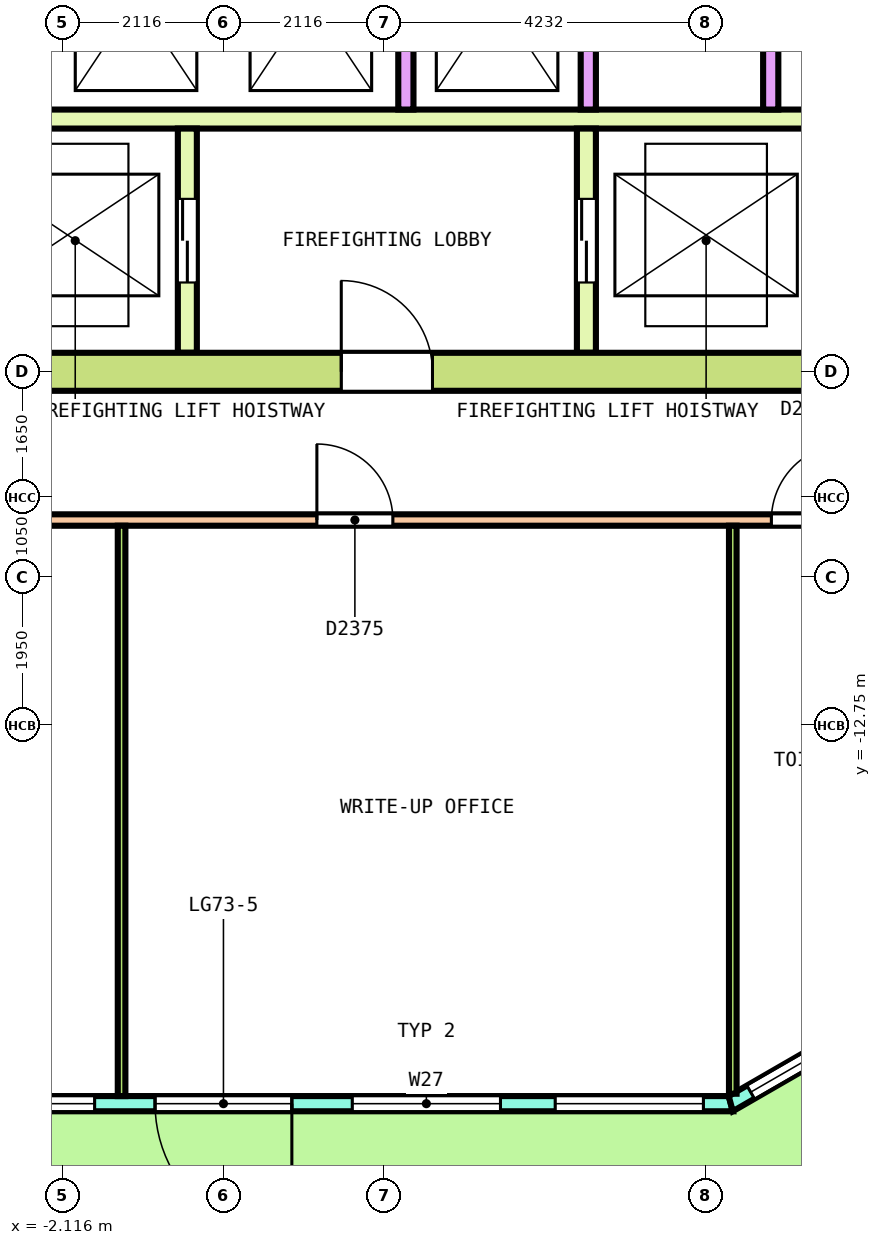
"""IFC4 building model, lengths in metres.
Left out: names, types, materials, properties, quantities, classifications, styles, units other than length and angle.
Written with IfcOpenShell. Run it as: python <this file> out.ifc"""

import sys

from ifc_helpers import new_model, si_unit, direction, frame, frame_2d, origin, place, context, subcontext, project, spatial, polyline, rectangle, outline, extrude, element, fill, save


model = new_model("IFC4")
c1 = context("Model", 3, precision=1e-05, world=origin(), true_north=direction((0.0, 1.0)))
c2 = subcontext(c1, "Body", "Model", "MODEL_VIEW")
j1 = project(units=[si_unit("LENGTHUNIT", "METRE"), si_unit("PLANEANGLEUNIT", "RADIAN")], contexts=[c1])
p1 = place(None, origin())
s1 = spatial("IfcSite", under=j1, at=p1, CompositionType="ELEMENT")
p2 = place(p1, origin())
s2 = spatial("IfcBuilding", under=s1, at=p2, CompositionType="ELEMENT")
p3 = place(p2, frame((0.0, 0.0, 328.6)))
s3 = spatial("IfcBuildingStorey", under=s2, at=p3, CompositionType="ELEMENT", Elevation=328.6)
p4 = place(p3, frame((-6.674, -17.729, 0.0), z_axis=(0.0, 0.0, 1.0), x_axis=(1.0, 0.0, 0.0)))
e1 = element("IfcWall", 1, at=p4, inside=s3, PredefinedType="SOLIDWALL", context=c2, shape_type="SweptSolid", body=[
    extrude(outline(polyline([(-0.027, -0.1), (1.004, -0.1), (2.035, -0.1), (3.066, -0.1), (4.097, -0.1), (5.128, -0.1), (6.159, -0.1), (7.189, -0.1), (8.22, -0.1), (9.251, -0.1), (10.282, -0.1), (11.313, -0.1), (12.344, -0.1), (13.375, -0.1), (13.321, 0.1), (12.299, 0.1), (11.276, 0.1), (10.253, 0.1), (9.231, 0.1), (8.208, 0.1), (7.185, 0.1), (6.163, 0.1), (5.14, 0.1), (4.117, 0.1), (3.095, 0.1), (2.072, 0.1), (1.05, 0.1), (0.027, 0.1), (-0.027, -0.1)])), origin(), (0.0, 0.0, 1.0), 3.7),
])
p5 = place(p4, frame((0.36, 0.0, 0.1)))
e2 = element("IfcOpeningElement", 2, at=p5, cuts=e1, PredefinedType="OPENING", context=c2, shape_type="SweptSolid", body=[
    extrude(rectangle(XDim=1.95, YDim=2.9, at=frame_2d((0.975, 1.45))), frame((0.0, 0.11, 0.0), z_axis=(0.0, -1.0, 0.0), x_axis=(1.0, 0.0, 0.0)), (0.0, 0.0, 1.0), 0.22),
])
p6 = place(p4, frame((3.03, 0.0, 0.1)))
e3 = element("IfcOpeningElement", 3, at=p6, cuts=e1, PredefinedType="OPENING", context=c2, shape_type="SweptSolid", body=[
    extrude(rectangle(XDim=1.95, YDim=2.9, at=frame_2d((0.975, 1.45))), frame((0.0, 0.11, 0.0), z_axis=(0.0, -1.0, 0.0), x_axis=(1.0, 0.0, 0.0)), (0.0, 0.0, 1.0), 0.22),
])
p7 = place(p4, frame((5.774, 0.0, 0.0)))
e4 = element("IfcOpeningElement", 4, at=p7, cuts=e1, PredefinedType="OPENING", context=c2, shape_type="SweptSolid", body=[
    extrude(rectangle(XDim=1.8, YDim=2.4, at=frame_2d((0.9, 1.2))), frame((0.0, 0.11, 0.0), z_axis=(0.0, -1.0, 0.0), x_axis=(1.0, 0.0, 0.0)), (0.0, 0.0, 1.0), 0.22),
])
p8 = place(p4, frame((5.774, 0.0, 2.55)))
e5 = element("IfcOpeningElement", 5, at=p8, cuts=e1, PredefinedType="OPENING", context=c2, shape_type="SweptSolid", body=[
    extrude(rectangle(XDim=1.8, YDim=0.45, at=frame_2d((0.9, 0.225))), frame((0.0, 0.11, 0.0), z_axis=(0.0, -1.0, 0.0), x_axis=(1.0, 0.0, 0.0)), (0.0, 0.0, 1.0), 0.22),
])
p9 = place(p4, frame((8.369, 0.0, 0.1)))
e6 = element("IfcOpeningElement", 6, at=p9, cuts=e1, PredefinedType="OPENING", context=c2, shape_type="SweptSolid", body=[
    extrude(rectangle(XDim=1.95, YDim=2.9, at=frame_2d((0.975, 1.45))), frame((0.0, 0.11, 0.0), z_axis=(0.0, -1.0, 0.0), x_axis=(1.0, 0.0, 0.0)), (0.0, 0.0, 1.0), 0.22),
])
p10 = place(p4, frame((11.038, 0.0, 0.1)))
e7 = element("IfcOpeningElement", 7, at=p10, cuts=e1, PredefinedType="OPENING", context=c2, shape_type="SweptSolid", body=[
    extrude(rectangle(XDim=1.95, YDim=2.9, at=frame_2d((0.975, 1.45))), frame((0.0, 0.11, 0.0), z_axis=(0.0, -1.0, 0.0), x_axis=(1.0, 0.0, 0.0)), (0.0, 0.0, 1.0), 0.22),
])
p11 = place(p3, frame((6.674, -17.729, 0.0), z_axis=(0.0, 0.0, 1.0), x_axis=(0.866029143232, 0.499993523031, 0.0)))
e8 = element("IfcWall", 8, at=p11, inside=s3, PredefinedType="SOLIDWALL", context=c2, shape_type="SweptSolid", body=[
    extrude(outline(polyline([(-0.027, -0.1), (1.214, -0.1), (2.456, -0.1), (3.697, -0.1), (4.938, -0.1), (4.885, 0.1), (3.67, 0.1), (2.456, 0.1), (1.241, 0.1), (0.027, 0.1), (-0.027, -0.1)])), origin(), (0.0, 0.0, 1.0), 3.7),
])
p12 = place(p11, frame((0.303, 0.0, 0.1)))
e9 = element("IfcOpeningElement", 9, at=p12, cuts=e8, PredefinedType="OPENING", context=c2, shape_type="SweptSolid", body=[
    extrude(rectangle(XDim=1.85, YDim=2.9, at=frame_2d((0.925, 1.45))), frame((0.0, 0.11, 0.0), z_axis=(0.0, -1.0, 0.0), x_axis=(1.0, 0.0, 0.0)), (0.0, 0.0, 1.0), 0.22),
])
p13 = place(p11, frame((2.759, 0.0, 0.1)))
e10 = element("IfcOpeningElement", 10, at=p13, cuts=e8, PredefinedType="OPENING", context=c2, shape_type="SweptSolid", body=[
    extrude(rectangle(XDim=1.85, YDim=2.9, at=frame_2d((0.925, 1.45))), frame((0.0, 0.11, 0.0), z_axis=(0.0, -1.0, 0.0), x_axis=(1.0, 0.0, 0.0)), (0.0, 0.0, 1.0), 0.22),
])
p14 = place(p3, frame((-9.85, -8.1, 0.0), z_axis=(0.0, 0.0, 1.0), x_axis=(1.0, 0.0, 0.0)))
e11 = element("IfcWall", 11, at=p14, inside=s3, PredefinedType="SHEAR", context=c2, shape_type="SweptSolid", body=[
    extrude(rectangle(XDim=19.7, YDim=0.5, at=frame_2d((9.85, 0.0))), origin(), (0.0, 0.0, 1.0), 3.7),
])
p15 = place(p14, frame((11.4, 0.0, 0.0)))
e12 = element("IfcOpeningElement", 12, at=p15, cuts=e11, PredefinedType="OPENING", context=c2, shape_type="SweptSolid", body=[
    extrude(rectangle(XDim=1.2, YDim=2.1, at=frame_2d((0.6, 1.05))), frame((0.0, 0.26, 0.0), z_axis=(0.0, -1.0, 0.0), x_axis=(1.0, 0.0, 0.0)), (0.0, 0.0, 1.0), 0.52),
])
p16 = place(p3, frame((-9.35, -4.775, 0.0), z_axis=(0.0, 0.0, 1.0), x_axis=(1.0, 0.0, 0.0)))
e13 = element("IfcWall", 13, at=p16, inside=s3, PredefinedType="SOLIDWALL", context=c2, shape_type="SweptSolid", body=[
    extrude(rectangle(XDim=18.7, YDim=0.25, at=frame_2d((9.35, 0.0))), origin(), (0.0, 0.0, 1.0), 3.7),
])
for number, where, z_axis, x_axis in (
    (14, (2.4, -4.65, 0.0), (0.0, 0.0, 1.0), (0.0, 1.0, 0.0)),
    (15, (4.8, -4.65, 0.0), (0.0, 0.0, 1.0), (0.0, 1.0, 0.0)),
    (16, (7.2, -4.65, 0.0), (0.0, 0.0, 1.0), (0.0, 1.0, 0.0)),
):
    element("IfcWall", number, at=place(p3, frame(where, z_axis=z_axis, x_axis=x_axis)), inside=s3, PredefinedType="SOLIDWALL", context=c2, shape_type="SweptSolid", body=[
        extrude(rectangle(XDim=2.9, YDim=0.2, at=frame_2d((1.45, 0.0))), origin(), (0.0, 0.0, 1.0), 3.7),
    ])
p17 = place(p3, frame((-0.475, -7.85, 0.0), z_axis=(0.0, 0.0, 1.0), x_axis=(0.0, 1.0, 0.0)))
e17 = element("IfcWall", 17, at=p17, inside=s3, PredefinedType="SOLIDWALL", context=c2, shape_type="SweptSolid", body=[
    extrude(rectangle(XDim=2.95, YDim=0.25, at=frame_2d((1.475, 0.0))), origin(), (0.0, 0.0, 1.0), 3.7),
])
p18 = place(p17, frame((0.925, 0.0, 0.0)))
e18 = element("IfcOpeningElement", 18, at=p18, cuts=e17, PredefinedType="OPENING", context=c2, shape_type="SweptSolid", body=[
    extrude(rectangle(XDim=1.1, YDim=2.1, at=frame_2d((0.55, 1.05))), frame((0.0, 0.135, 0.0), z_axis=(0.0, -1.0, 0.0), x_axis=(1.0, 0.0, 0.0)), (0.0, 0.0, 1.0), 0.27),
])
p19 = place(p3, frame((4.775, -7.85, 0.0), z_axis=(0.0, 0.0, 1.0), x_axis=(0.0, 1.0, 0.0)))
e19 = element("IfcWall", 19, at=p19, inside=s3, PredefinedType="SOLIDWALL", context=c2, shape_type="SweptSolid", body=[
    extrude(rectangle(XDim=2.95, YDim=0.25, at=frame_2d((1.475, 0.0))), origin(), (0.0, 0.0, 1.0), 3.7),
])
p20 = place(p19, frame((0.925, 0.0, 0.0)))
e20 = element("IfcOpeningElement", 20, at=p20, cuts=e19, PredefinedType="OPENING", context=c2, shape_type="SweptSolid", body=[
    extrude(rectangle(XDim=1.1, YDim=2.1, at=frame_2d((0.55, 1.05))), frame((0.0, 0.135, 0.0), z_axis=(0.0, -1.0, 0.0), x_axis=(1.0, 0.0, 0.0)), (0.0, 0.0, 1.0), 0.27),
])
p21 = place(p3, frame((-11.025, -10.05, 0.0), z_axis=(0.0, 0.0, 1.0), x_axis=(1.0, 0.0, 0.0)))
e21 = element("IfcWall", 21, at=p21, inside=s3, PredefinedType="PARTITIONING", context=c2, shape_type="SweptSolid", body=[
    extrude(rectangle(XDim=21.925, YDim=0.15, at=frame_2d((10.962, 0.0))), origin(), (0.0, 0.0, 1.0), 3.05),
])
p22 = place(p21, frame((2.082, 0.0, 0.0)))
e22 = element("IfcOpeningElement", 22, at=p22, cuts=e21, PredefinedType="OPENING", context=c2, shape_type="SweptSolid", body=[
    extrude(rectangle(XDim=1.0, YDim=2.1, at=frame_2d((0.5, 1.05))), frame((0.0, 0.085, 0.0), z_axis=(0.0, -1.0, 0.0), x_axis=(1.0, 0.0, 0.0)), (0.0, 0.0, 1.0), 0.17),
])
p23 = place(p21, frame((7.054, 0.0, 0.0)))
e23 = element("IfcOpeningElement", 23, at=p23, cuts=e21, PredefinedType="OPENING", context=c2, shape_type="SweptSolid", body=[
    extrude(rectangle(XDim=1.0, YDim=2.1, at=frame_2d((0.5, 1.05))), frame((0.0, 0.085, 0.0), z_axis=(0.0, -1.0, 0.0), x_axis=(1.0, 0.0, 0.0)), (0.0, 0.0, 1.0), 0.17),
])
p24 = place(p21, frame((12.254, 0.0, 0.0)))
e24 = element("IfcOpeningElement", 24, at=p24, cuts=e21, PredefinedType="OPENING", context=c2, shape_type="SweptSolid", body=[
    extrude(rectangle(XDim=1.0, YDim=2.1, at=frame_2d((0.5, 1.05))), frame((0.0, 0.085, 0.0), z_axis=(0.0, -1.0, 0.0), x_axis=(1.0, 0.0, 0.0)), (0.0, 0.0, 1.0), 0.17),
])
p25 = place(p21, frame((18.233, 0.0, 0.0)))
e25 = element("IfcOpeningElement", 25, at=p25, cuts=e21, PredefinedType="OPENING", context=c2, shape_type="SweptSolid", body=[
    extrude(rectangle(XDim=1.0, YDim=2.1, at=frame_2d((0.5, 1.05))), frame((0.0, 0.085, 0.0), z_axis=(0.0, -1.0, 0.0), x_axis=(1.0, 0.0, 0.0)), (0.0, 0.0, 1.0), 0.17),
])
p26 = place(p21, frame((20.525, 0.0, 0.0)))
e26 = element("IfcOpeningElement", 26, at=p26, cuts=e21, PredefinedType="OPENING", context=c2, shape_type="SweptSolid", body=[
    extrude(rectangle(XDim=1.0, YDim=2.1, at=frame_2d((0.5, 1.05))), frame((0.0, 0.085, 0.0), z_axis=(0.0, -1.0, 0.0), x_axis=(1.0, 0.0, 0.0)), (0.0, 0.0, 1.0), 0.17),
])
p27 = place(p3, frame((-1.34, -17.628, 0.0), z_axis=(0.0, 0.0, 1.0), x_axis=(0.0, 1.0, 0.0)))
e27 = element("IfcWall", 27, at=p27, inside=s3, PredefinedType="PARTITIONING", context=c2, shape_type="SweptSolid", body=[
    extrude(rectangle(XDim=7.503, YDim=0.1, at=frame_2d((3.752, 0.0))), origin(), (0.0, 0.0, 1.0), 3.05),
])
p28 = place(p3, frame((6.701, -17.598, 0.0), z_axis=(0.0, 0.0, 1.0), x_axis=(0.0, 1.0, 0.0)))
e28 = element("IfcWall", 28, at=p28, inside=s3, PredefinedType="PARTITIONING", context=c2, shape_type="SweptSolid", body=[
    extrude(rectangle(XDim=7.473, YDim=0.1, at=frame_2d((3.736, 0.0))), origin(), (0.0, 0.0, 1.0), 3.05),
])
p29 = place(p6, origin())
e29 = element("IfcWindow", 29, at=p29, inside=s3, PartitioningType="SINGLE_PANEL", PredefinedType="WINDOW", context=c2, shape_type="SweptSolid", body=[
    extrude(rectangle(XDim=1.95, YDim=2.9, at=frame_2d((0.975, 1.45))), frame((0.0, 0.03, 0.0), z_axis=(0.0, -1.0, 0.0), x_axis=(1.0, 0.0, 0.0)), (0.0, 0.0, 1.0), 0.06),
])
fill(e3, e29)
p30 = place(p7, origin())
e30 = element("IfcDoor", 30, at=p30, inside=s3, OperationType="DOUBLE_DOOR_SINGLE_SWING", PredefinedType="DOOR", context=c2, shape_type="SweptSolid", body=[
    extrude(rectangle(XDim=1.8, YDim=2.4, at=frame_2d((0.9, 1.2))), frame((0.0, 0.025, 0.0), z_axis=(0.0, -1.0, 0.0), x_axis=(1.0, 0.0, 0.0)), (0.0, 0.0, 1.0), 0.05),
])
fill(e4, e30)
p31 = place(p8, origin())
e31 = element("IfcWindow", 31, at=p31, inside=s3, PartitioningType="SINGLE_PANEL", PredefinedType="WINDOW", context=c2, shape_type="SweptSolid", body=[
    extrude(rectangle(XDim=1.8, YDim=0.45, at=frame_2d((0.9, 0.225))), frame((0.0, 0.03, 0.0), z_axis=(0.0, -1.0, 0.0), x_axis=(1.0, 0.0, 0.0)), (0.0, 0.0, 1.0), 0.06),
])
fill(e5, e31)
p32 = place(p9, origin())
e32 = element("IfcWindow", 32, at=p32, inside=s3, PartitioningType="SINGLE_PANEL", PredefinedType="WINDOW", context=c2, shape_type="SweptSolid", body=[
    extrude(rectangle(XDim=1.95, YDim=2.9, at=frame_2d((0.975, 1.45))), frame((0.0, 0.03, 0.0), z_axis=(0.0, -1.0, 0.0), x_axis=(1.0, 0.0, 0.0)), (0.0, 0.0, 1.0), 0.06),
])
fill(e6, e32)
p33 = place(p10, origin())
e33 = element("IfcWindow", 33, at=p33, inside=s3, PartitioningType="SINGLE_PANEL", PredefinedType="WINDOW", context=c2, shape_type="SweptSolid", body=[
    extrude(rectangle(XDim=1.95, YDim=2.9, at=frame_2d((0.975, 1.45))), frame((0.0, 0.03, 0.0), z_axis=(0.0, -1.0, 0.0), x_axis=(1.0, 0.0, 0.0)), (0.0, 0.0, 1.0), 0.06),
])
fill(e7, e33)
p34 = place(p12, origin())
e34 = element("IfcWindow", 34, at=p34, inside=s3, PartitioningType="SINGLE_PANEL", PredefinedType="WINDOW", context=c2, shape_type="SweptSolid", body=[
    extrude(rectangle(XDim=1.85, YDim=2.9, at=frame_2d((0.925, 1.45))), frame((0.0, 0.03, 0.0), z_axis=(0.0, -1.0, 0.0), x_axis=(1.0, 0.0, 0.0)), (0.0, 0.0, 1.0), 0.06),
])
fill(e9, e34)
p35 = place(p18, origin())
e35 = element("IfcDoor", 35, at=p35, inside=s3, OperationType="DOUBLE_DOOR_SLIDING", PredefinedType="DOOR", context=c2, shape_type="SweptSolid", body=[
    extrude(rectangle(XDim=1.1, YDim=2.1, at=frame_2d((0.55, 1.05))), frame((0.0, 0.075, 0.0), z_axis=(0.0, -1.0, 0.0), x_axis=(1.0, 0.0, 0.0)), (0.0, 0.0, 1.0), 0.15),
])
fill(e18, e35)
p36 = place(p20, origin())
e36 = element("IfcDoor", 36, at=p36, inside=s3, OperationType="DOUBLE_DOOR_SLIDING", PredefinedType="DOOR", context=c2, shape_type="SweptSolid", body=[
    extrude(rectangle(XDim=1.1, YDim=2.1, at=frame_2d((0.55, 1.05))), frame((0.0, 0.075, 0.0), z_axis=(0.0, -1.0, 0.0), x_axis=(1.0, 0.0, 0.0)), (0.0, 0.0, 1.0), 0.15),
])
fill(e20, e36)
p37 = place(p15, origin())
e37 = element("IfcDoor", 37, at=p37, inside=s3, OperationType="SINGLE_SWING_LEFT", PredefinedType="DOOR", context=c2, shape_type="SweptSolid", body=[
    extrude(rectangle(XDim=1.2, YDim=2.1, at=frame_2d((0.6, 1.05))), frame((0.0, 0.2, 0.0), z_axis=(0.0, -1.0, 0.0), x_axis=(1.0, 0.0, 0.0)), (0.0, 0.0, 1.0), 0.4),
])
fill(e12, e37)
p38 = place(p24, origin())
e38 = element("IfcDoor", 38, at=p38, inside=s3, OperationType="SINGLE_SWING_LEFT", PredefinedType="DOOR", context=c2, shape_type="SweptSolid", body=[
    extrude(rectangle(XDim=1.0, YDim=2.1, at=frame_2d((0.5, 1.05))), frame((0.0, 0.025, 0.0), z_axis=(0.0, -1.0, 0.0), x_axis=(1.0, 0.0, 0.0)), (0.0, 0.0, 1.0), 0.05),
])
fill(e24, e38)
p39 = place(p25, origin())
e39 = element("IfcDoor", 39, at=p39, inside=s3, OperationType="SINGLE_SWING_LEFT", PredefinedType="DOOR", context=c2, shape_type="SweptSolid", body=[
    extrude(rectangle(XDim=1.0, YDim=2.1, at=frame_2d((0.5, 1.05))), frame((0.0, 0.025, 0.0), z_axis=(0.0, -1.0, 0.0), x_axis=(1.0, 0.0, 0.0)), (0.0, 0.0, 1.0), 0.05),
])
fill(e25, e39)
save(model, sys.argv[1])
